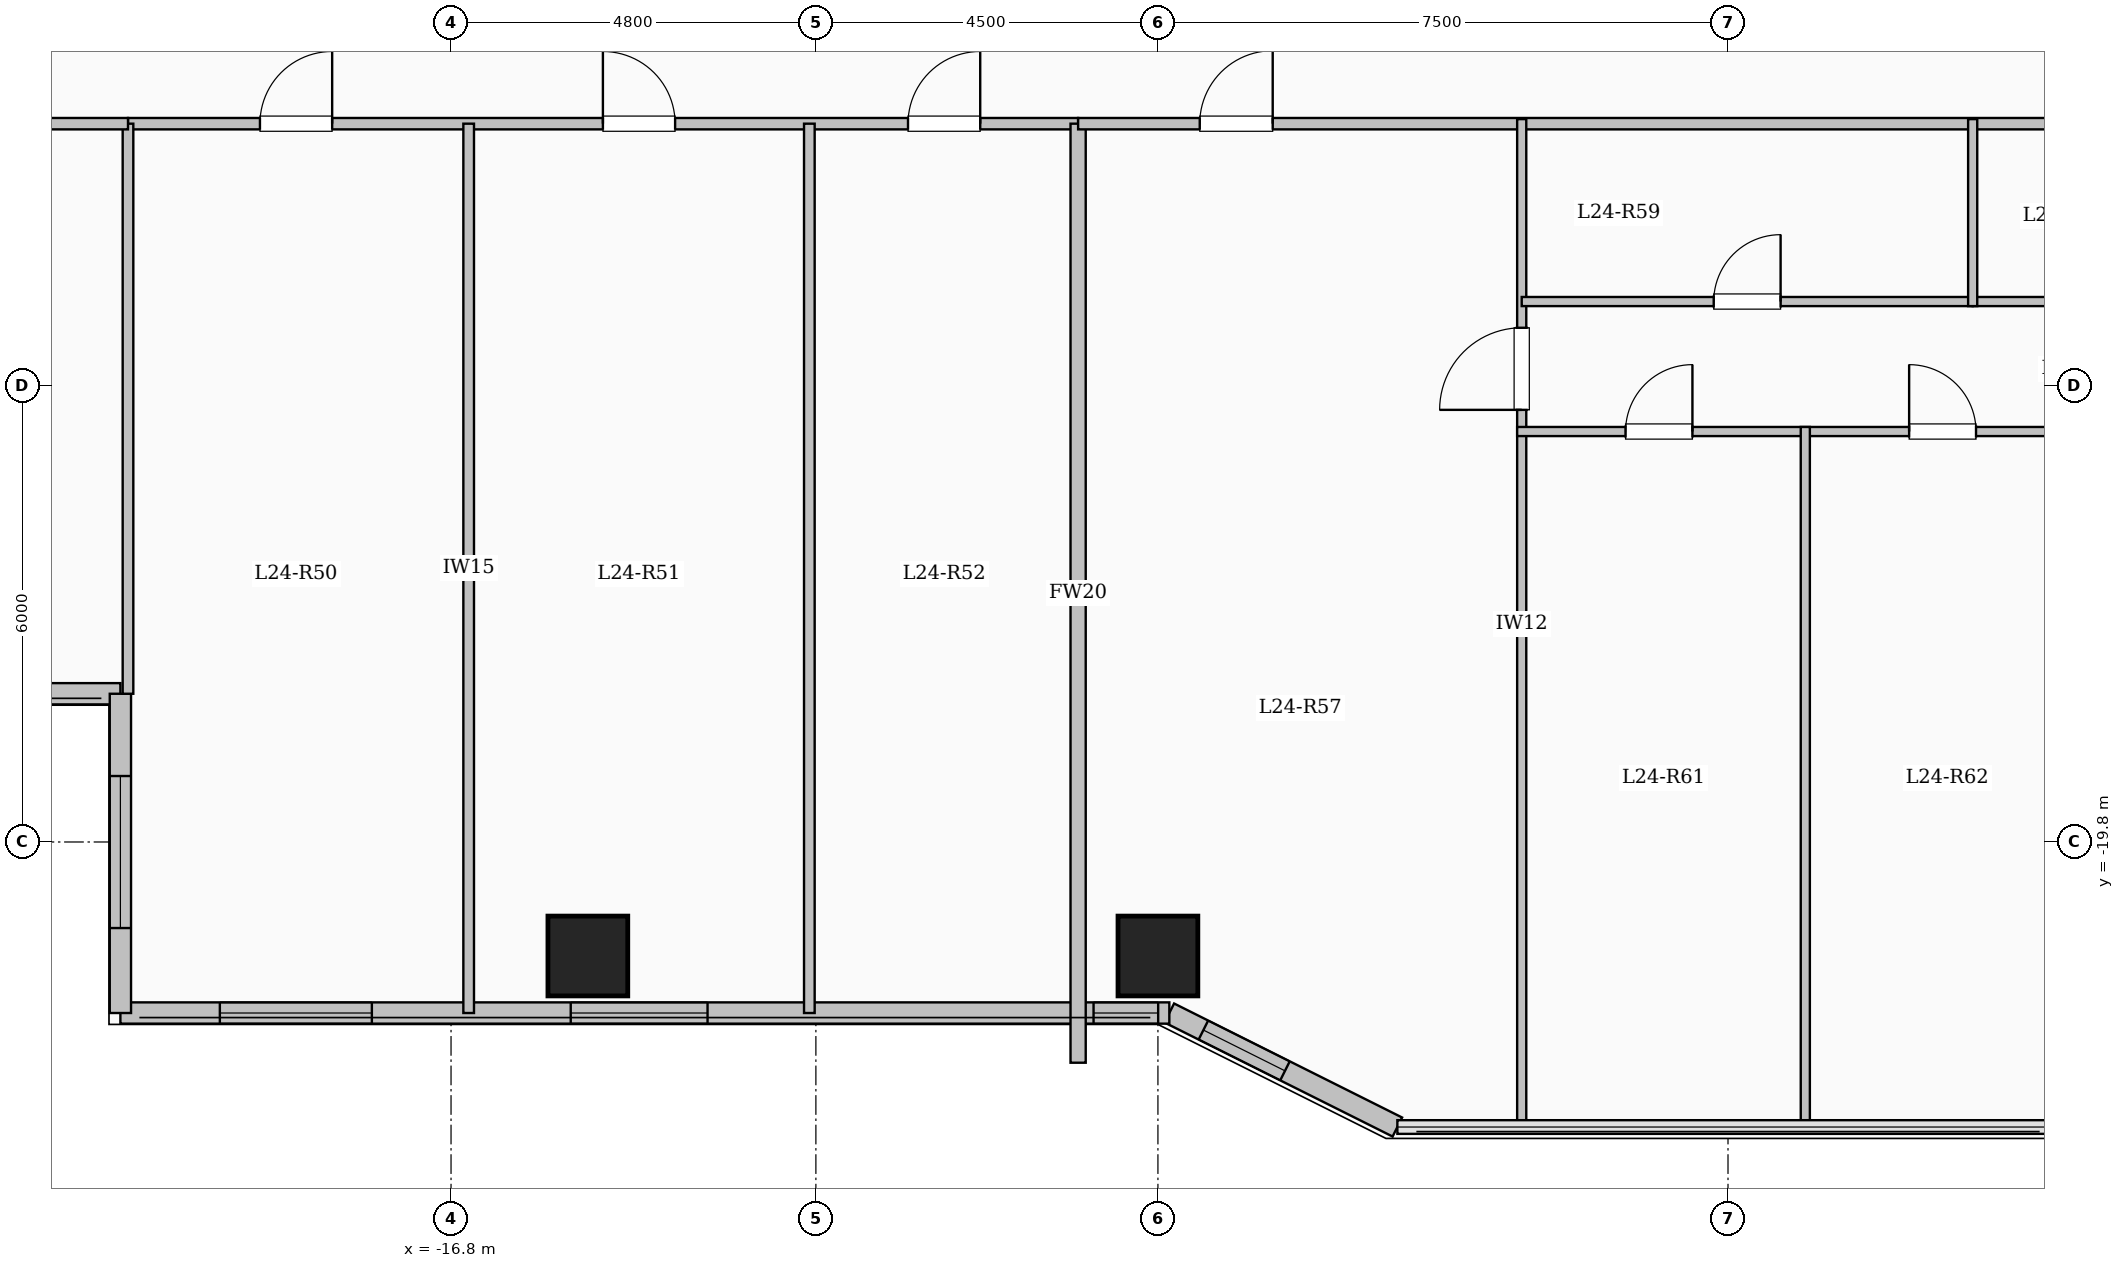
"""IFC4 building model, lengths in metres.
Left out: names, types, materials, properties, quantities, classifications, styles, units other than length and angle.
Written with IfcOpenShell. Run it as: python <this file> out.ifc"""

import sys

from ifc_helpers import new_model, si_unit, direction, frame, frame_2d, origin, origin_2d, place, context, subcontext, project, spatial, rectangle, extrude, element, fill, save


model = new_model("IFC4")
c1 = context("Model", 3, precision=1e-05, world=origin(), true_north=direction((0.0, 1.0)))
c2 = subcontext(c1, "Body", "Model", "MODEL_VIEW")
j1 = project(units=[si_unit("LENGTHUNIT", "METRE"), si_unit("PLANEANGLEUNIT", "RADIAN")], contexts=[c1])
p1 = place(None, origin())
s1 = spatial("IfcSite", under=j1, at=p1, CompositionType="ELEMENT")
p2 = place(p1, origin())
s2 = spatial("IfcBuilding", under=s1, at=p2, CompositionType="ELEMENT")
p3 = place(p2, frame((0.0, 0.0, 91.7)))
s3 = spatial("IfcBuildingStorey", under=s2, at=p3, CompositionType="ELEMENT", Elevation=91.7)
for number, where, z_axis, x_axis in (
    (1, (-15.0, -21.3, 0.0), (0.0, 0.0, 1.0), (1.0, 0.0, 0.0)),
    (2, (-7.5, -21.3, 0.0), (0.0, 0.0, 1.0), (1.0, 0.0, 0.0)),
):
    element("IfcColumn", number, at=place(p3, frame(where, z_axis=z_axis, x_axis=x_axis)), inside=s3, PredefinedType="COLUMN", context=c2, shape_type="SweptSolid", body=[
        extrude(rectangle(XDim=1.05, YDim=1.05, at=origin_2d()), origin(), (0.0, 0.0, 1.0), 3.35),
    ])
p4 = place(p3, frame((-21.15, -17.85, 0.0), z_axis=(0.0, 0.0, 1.0), x_axis=(-1.0, 0.0, 0.0)))
e3 = element("IfcWall", 3, at=p4, inside=s3, PredefinedType="SOLIDWALL", context=c2, shape_type="SweptSolid", body=[
    extrude(rectangle(XDim=5.7, YDim=0.28, at=frame_2d((2.85, 0.0))), origin(), (0.0, 0.0, 1.0), 3.1),
])
p5 = place(p4, frame((1.625, 0.0, 0.9)))
e4 = element("IfcOpeningElement", 4, at=p5, cuts=e3, PredefinedType="OPENING", context=c2, shape_type="SweptSolid", body=[
    extrude(rectangle(XDim=2.4, YDim=1.8, at=frame_2d((1.2, 0.9))), frame((0.0, 0.15, 0.0), z_axis=(0.0, -1.0, 0.0), x_axis=(1.0, 0.0, 0.0)), (0.0, 0.0, 1.0), 0.3),
])
p6 = place(p3, frame((-4.35, -23.55, 0.0), z_axis=(0.0, 0.0, 1.0), x_axis=(-0.894427191, 0.4472135955, 0.0)))
e5 = element("IfcWall", 5, at=p6, inside=s3, PredefinedType="SOLIDWALL", context=c2, shape_type="SweptSolid", body=[
    extrude(rectangle(XDim=3.354, YDim=0.28, at=frame_2d((1.677, 0.0))), origin(), (0.0, 0.0, 1.0), 3.1),
])
p7 = place(p6, frame((1.653, 0.0, 0.95)))
e6 = element("IfcOpeningElement", 6, at=p7, cuts=e5, PredefinedType="OPENING", context=c2, shape_type="SweptSolid", body=[
    extrude(rectangle(XDim=1.2, YDim=1.5, at=frame_2d((0.6, 0.75))), frame((0.0, 0.15, 0.0), z_axis=(0.0, -1.0, 0.0), x_axis=(1.0, 0.0, 0.0)), (0.0, 0.0, 1.0), 0.3),
])
p8 = place(p3, frame((-7.35, -22.05, 0.0), z_axis=(0.0, 0.0, 1.0), x_axis=(-1.0, 0.0, 0.0)))
e7 = element("IfcWall", 7, at=p8, inside=s3, PredefinedType="SOLIDWALL", context=c2, shape_type="SweptSolid", body=[
    extrude(rectangle(XDim=13.8, YDim=0.28, at=frame_2d((6.9, 0.0))), origin(), (0.0, 0.0, 1.0), 3.1),
])
p9 = place(p8, frame((0.147, 0.0, 0.95)))
e8 = element("IfcOpeningElement", 8, at=p9, cuts=e7, PredefinedType="OPENING", context=c2, shape_type="SweptSolid", body=[
    extrude(rectangle(XDim=0.85, YDim=1.5, at=frame_2d((0.425, 0.75))), frame((0.0, 0.15, 0.0), z_axis=(0.0, -1.0, 0.0), x_axis=(1.0, 0.0, 0.0)), (0.0, 0.0, 1.0), 0.3),
])
p10 = place(p8, frame((6.075, 0.0, 0.9)))
e9 = element("IfcOpeningElement", 9, at=p10, cuts=e7, PredefinedType="OPENING", context=c2, shape_type="SweptSolid", body=[
    extrude(rectangle(XDim=1.8, YDim=1.65, at=frame_2d((0.9, 0.825))), frame((0.0, 0.15, 0.0), z_axis=(0.0, -1.0, 0.0), x_axis=(1.0, 0.0, 0.0)), (0.0, 0.0, 1.0), 0.3),
])
p11 = place(p8, frame((10.492, 0.0, 0.9)))
e10 = element("IfcOpeningElement", 10, at=p11, cuts=e7, PredefinedType="OPENING", context=c2, shape_type="SweptSolid", body=[
    extrude(rectangle(XDim=2.0, YDim=1.7, at=frame_2d((1.0, 0.85))), frame((0.0, 0.15, 0.0), z_axis=(0.0, -1.0, 0.0), x_axis=(1.0, 0.0, 0.0)), (0.0, 0.0, 1.0), 0.3),
])
p12 = place(p3, frame((-21.15, -22.05, 0.0), z_axis=(0.0, 0.0, 1.0), x_axis=(0.0, 1.0, 0.0)))
e11 = element("IfcWall", 11, at=p12, inside=s3, PredefinedType="SOLIDWALL", context=c2, shape_type="SweptSolid", body=[
    extrude(rectangle(XDim=4.2, YDim=0.28, at=frame_2d((2.1, 0.0))), origin(), (0.0, 0.0, 1.0), 3.1),
])
p13 = place(p12, frame((1.118, 0.0, 0.9)))
e12 = element("IfcOpeningElement", 12, at=p13, cuts=e11, PredefinedType="OPENING", context=c2, shape_type="SweptSolid", body=[
    extrude(rectangle(XDim=2.0, YDim=1.7, at=frame_2d((1.0, 0.85))), frame((0.0, 0.15, 0.0), z_axis=(0.0, -1.0, 0.0), x_axis=(1.0, 0.0, 0.0)), (0.0, 0.0, 1.0), 0.3),
])
p14 = place(p3, frame((-21.05, -10.35, 0.0), z_axis=(0.0, 0.0, 1.0), x_axis=(1.0, 0.0, 0.0)))
e13 = element("IfcWall", 13, at=p14, inside=s3, PredefinedType="PARTITIONING", context=c2, shape_type="SweptSolid", body=[
    extrude(rectangle(XDim=12.5, YDim=0.15, at=frame_2d((6.25, 0.0))), origin(), (0.0, 0.0, 1.0), 3.1),
])
p15 = place(p14, frame((1.736, 0.0, 0.0)))
e14 = element("IfcOpeningElement", 14, at=p15, cuts=e13, PredefinedType="OPENING", context=c2, shape_type="SweptSolid", body=[
    extrude(rectangle(XDim=0.95, YDim=2.15, at=frame_2d((0.475, 1.075))), frame((0.0, 0.085, 0.0), z_axis=(0.0, -1.0, 0.0), x_axis=(1.0, 0.0, 0.0)), (0.0, 0.0, 1.0), 0.17),
])
p16 = place(p14, frame((6.248, 0.0, 0.0)))
e15 = element("IfcOpeningElement", 15, at=p16, cuts=e13, PredefinedType="OPENING", context=c2, shape_type="SweptSolid", body=[
    extrude(rectangle(XDim=0.95, YDim=2.15, at=frame_2d((0.475, 1.075))), frame((0.0, 0.085, 0.0), z_axis=(0.0, -1.0, 0.0), x_axis=(1.0, 0.0, 0.0)), (0.0, 0.0, 1.0), 0.17),
])
p17 = place(p14, frame((10.262, 0.0, 0.0)))
e16 = element("IfcOpeningElement", 16, at=p17, cuts=e13, PredefinedType="OPENING", context=c2, shape_type="SweptSolid", body=[
    extrude(rectangle(XDim=0.95, YDim=2.15, at=frame_2d((0.475, 1.075))), frame((0.0, 0.085, 0.0), z_axis=(0.0, -1.0, 0.0), x_axis=(1.0, 0.0, 0.0)), (0.0, 0.0, 1.0), 0.17),
])
for number, where, z_axis, x_axis in (
    (17, (-16.568, -22.05, 0.0), (0.0, 0.0, 1.0), (0.0, 1.0, 0.0)),
    (18, (-12.086, -22.05, 0.0), (0.0, 0.0, 1.0), (0.0, 1.0, 0.0)),
):
    element("IfcWall", number, at=place(p3, frame(where, z_axis=z_axis, x_axis=x_axis)), inside=s3, PredefinedType="PARTITIONING", context=c2, shape_type="SweptSolid", body=[
        extrude(rectangle(XDim=11.7, YDim=0.14, at=frame_2d((5.85, 0.0))), origin(), (0.0, 0.0, 1.0), 3.1),
    ])
p18 = place(p3, frame((-8.55, -22.704, 0.0), z_axis=(0.0, 0.0, 1.0), x_axis=(0.0, 1.0, 0.0)))
e19 = element("IfcWall", 19, at=p18, inside=s3, PredefinedType="SOLIDWALL", context=c2, shape_type="SweptSolid", body=[
    extrude(rectangle(XDim=12.354, YDim=0.2, at=frame_2d((6.177, 0.0))), origin(), (0.0, 0.0, 1.0), 3.1),
])
p19 = place(p3, frame((-8.55, -10.35, 0.0), z_axis=(0.0, 0.0, 1.0), x_axis=(1.0, 0.0, 0.0)))
e20 = element("IfcWall", 20, at=p19, inside=s3, PredefinedType="PARTITIONING", context=c2, shape_type="SweptSolid", body=[
    extrude(rectangle(XDim=17.1, YDim=0.15, at=frame_2d((8.55, 0.0))), origin(), (0.0, 0.0, 1.0), 3.1),
])
p20 = place(p19, frame((1.6, 0.0, 0.0)))
e21 = element("IfcOpeningElement", 21, at=p20, cuts=e20, PredefinedType="OPENING", context=c2, shape_type="SweptSolid", body=[
    extrude(rectangle(XDim=0.96, YDim=2.15, at=frame_2d((0.48, 1.075))), frame((0.0, 0.085, 0.0), z_axis=(0.0, -1.0, 0.0), x_axis=(1.0, 0.0, 0.0)), (0.0, 0.0, 1.0), 0.17),
])
p21 = place(p3, frame((-2.714, -23.58, 0.0), z_axis=(0.0, 0.0, 1.0), x_axis=(0.0, 1.0, 0.0)))
e22 = element("IfcWall", 22, at=p21, inside=s3, PredefinedType="PARTITIONING", context=c2, shape_type="SweptSolid", body=[
    extrude(rectangle(XDim=13.29, YDim=0.12, at=frame_2d((6.645, 0.0))), origin(), (0.0, 0.0, 1.0), 3.1),
])
p22 = place(p21, frame((9.465, 0.0, 0.0)))
e23 = element("IfcOpeningElement", 23, at=p22, cuts=e22, PredefinedType="OPENING", context=c2, shape_type="SweptSolid", body=[
    extrude(rectangle(XDim=1.08, YDim=2.15, at=frame_2d((0.54, 1.075))), frame((0.0, 0.07, 0.0), z_axis=(0.0, -1.0, 0.0), x_axis=(1.0, 0.0, 0.0)), (0.0, 0.0, 1.0), 0.14),
])
p23 = place(p3, frame((-2.714, -12.69, 0.0), z_axis=(0.0, 0.0, 1.0), x_axis=(1.0, 0.0, 0.0)))
e24 = element("IfcWall", 24, at=p23, inside=s3, PredefinedType="PARTITIONING", context=c2, shape_type="SweptSolid", body=[
    extrude(rectangle(XDim=5.933, YDim=0.12, at=frame_2d((2.967, 0.0))), origin(), (0.0, 0.0, 1.0), 2.635),
])
p24 = place(p23, frame((2.526, 0.0, 0.0)))
e25 = element("IfcOpeningElement", 25, at=p24, cuts=e24, PredefinedType="OPENING", context=c2, shape_type="SweptSolid", body=[
    extrude(rectangle(XDim=0.88, YDim=2.1, at=frame_2d((0.44, 1.05))), frame((0.0, 0.07, 0.0), z_axis=(0.0, -1.0, 0.0), x_axis=(1.0, 0.0, 0.0)), (0.0, 0.0, 1.0), 0.14),
])
p25 = place(p3, frame((3.219, -12.69, 0.0), z_axis=(0.0, 0.0, 1.0), x_axis=(1.0, 0.0, 0.0)))
e26 = element("IfcWall", 26, at=p25, inside=s3, PredefinedType="PARTITIONING", context=c2, shape_type="SweptSolid", body=[
    extrude(rectangle(XDim=5.331, YDim=0.12, at=frame_2d((2.666, 0.0))), origin(), (0.0, 0.0, 1.0), 2.635),
])
p26 = place(p25, frame((2.226, 0.0, 0.0)))
e27 = element("IfcOpeningElement", 27, at=p26, cuts=e26, PredefinedType="OPENING", context=c2, shape_type="SweptSolid", body=[
    extrude(rectangle(XDim=0.88, YDim=2.1, at=frame_2d((0.44, 1.05))), frame((0.0, 0.07, 0.0), z_axis=(0.0, -1.0, 0.0), x_axis=(1.0, 0.0, 0.0)), (0.0, 0.0, 1.0), 0.14),
])
p27 = place(p3, frame((-2.774, -14.4, 0.0), z_axis=(0.0, 0.0, 1.0), x_axis=(1.0, 0.0, 0.0)))
e28 = element("IfcWall", 28, at=p27, inside=s3, PredefinedType="PARTITIONING", context=c2, shape_type="SweptSolid", body=[
    extrude(rectangle(XDim=11.384, YDim=0.12, at=frame_2d((5.692, 0.0))), origin(), (0.0, 0.0, 1.0), 2.635),
])
p28 = place(p27, frame((1.426, 0.0, 0.0)))
e29 = element("IfcOpeningElement", 29, at=p28, cuts=e28, PredefinedType="OPENING", context=c2, shape_type="SweptSolid", body=[
    extrude(rectangle(XDim=0.88, YDim=2.1, at=frame_2d((0.44, 1.05))), frame((0.0, 0.07, 0.0), z_axis=(0.0, -1.0, 0.0), x_axis=(1.0, 0.0, 0.0)), (0.0, 0.0, 1.0), 0.14),
])
p29 = place(p27, frame((5.157, 0.0, 0.0)))
e30 = element("IfcOpeningElement", 30, at=p29, cuts=e28, PredefinedType="OPENING", context=c2, shape_type="SweptSolid", body=[
    extrude(rectangle(XDim=0.88, YDim=2.1, at=frame_2d((0.44, 1.05))), frame((0.0, 0.07, 0.0), z_axis=(0.0, -1.0, 0.0), x_axis=(1.0, 0.0, 0.0)), (0.0, 0.0, 1.0), 0.14),
])
p30 = place(p27, frame((8.888, 0.0, 0.0)))
e31 = element("IfcOpeningElement", 31, at=p30, cuts=e28, PredefinedType="OPENING", context=c2, shape_type="SweptSolid", body=[
    extrude(rectangle(XDim=0.88, YDim=2.1, at=frame_2d((0.44, 1.05))), frame((0.0, 0.07, 0.0), z_axis=(0.0, -1.0, 0.0), x_axis=(1.0, 0.0, 0.0)), (0.0, 0.0, 1.0), 0.14),
])
p31 = place(p3, frame((3.219, -12.75, 0.0), z_axis=(0.0, 0.0, 1.0), x_axis=(0.0, 1.0, 0.0)))
e32 = element("IfcWall", 32, at=p31, inside=s3, PredefinedType="PARTITIONING", context=c2, shape_type="SweptSolid", body=[
    extrude(rectangle(XDim=2.46, YDim=0.12, at=frame_2d((1.23, 0.0))), origin(), (0.0, 0.0, 1.0), 3.1),
])
p32 = place(p3, frame((1.017, -23.58, 0.0), z_axis=(0.0, 0.0, 1.0), x_axis=(0.0, 1.0, 0.0)))
e33 = element("IfcWall", 33, at=p32, inside=s3, PredefinedType="PARTITIONING", context=c2, shape_type="SweptSolid", body=[
    extrude(rectangle(XDim=9.24, YDim=0.12, at=frame_2d((4.62, 0.0))), origin(), (0.0, 0.0, 1.0), 3.1),
])
p33 = place(p3, frame((-21.05, -17.85, 0.0), z_axis=(0.0, 0.0, 1.0), x_axis=(0.0, 1.0, 0.0)))
e34 = element("IfcWall", 34, at=p33, inside=s3, PredefinedType="PARTITIONING", context=c2, shape_type="SweptSolid", body=[
    extrude(rectangle(XDim=7.5, YDim=0.14, at=frame_2d((3.75, 0.0))), origin(), (0.0, 0.0, 1.0), 3.1),
])
p34 = place(p3, frame((-26.88, -10.35, 0.0), z_axis=(0.0, 0.0, 1.0), x_axis=(1.0, 0.0, 0.0)))
e35 = element("IfcWall", 35, at=p34, inside=s3, PredefinedType="PARTITIONING", context=c2, shape_type="SweptSolid", body=[
    extrude(rectangle(XDim=5.83, YDim=0.15, at=frame_2d((2.915, 0.0))), origin(), (0.0, 0.0, 1.0), 3.1),
])
p35 = place(p34, frame((2.44, 0.0, 0.0)))
e36 = element("IfcOpeningElement", 36, at=p35, cuts=e35, PredefinedType="OPENING", context=c2, shape_type="SweptSolid", body=[
    extrude(rectangle(XDim=0.95, YDim=2.15, at=frame_2d((0.475, 1.075))), frame((0.0, 0.085, 0.0), z_axis=(0.0, -1.0, 0.0), x_axis=(1.0, 0.0, 0.0)), (0.0, 0.0, 1.0), 0.17),
])
p36 = place(p7, origin())
e37 = element("IfcWindow", 37, at=p36, inside=s3, PartitioningType="SINGLE_PANEL", PredefinedType="WINDOW", context=c2, shape_type="SweptSolid", body=[
    extrude(rectangle(XDim=1.2, YDim=1.5, at=frame_2d((0.6, 0.75))), frame((0.0, 0.03, 0.0), z_axis=(0.0, -1.0, 0.0), x_axis=(1.0, 0.0, 0.0)), (0.0, 0.0, 1.0), 0.06),
])
fill(e6, e37)
p37 = place(p9, origin())
e38 = element("IfcWindow", 38, at=p37, inside=s3, PartitioningType="SINGLE_PANEL", PredefinedType="WINDOW", context=c2, shape_type="SweptSolid", body=[
    extrude(rectangle(XDim=0.85, YDim=1.5, at=frame_2d((0.425, 0.75))), frame((0.0, 0.03, 0.0), z_axis=(0.0, -1.0, 0.0), x_axis=(1.0, 0.0, 0.0)), (0.0, 0.0, 1.0), 0.06),
])
fill(e8, e38)
p38 = place(p10, origin())
e39 = element("IfcWindow", 39, at=p38, inside=s3, PartitioningType="SINGLE_PANEL", PredefinedType="WINDOW", context=c2, shape_type="SweptSolid", body=[
    extrude(rectangle(XDim=1.8, YDim=1.65, at=frame_2d((0.9, 0.825))), frame((0.0, 0.03, 0.0), z_axis=(0.0, -1.0, 0.0), x_axis=(1.0, 0.0, 0.0)), (0.0, 0.0, 1.0), 0.06),
])
fill(e9, e39)
p39 = place(p11, origin())
e40 = element("IfcWindow", 40, at=p39, inside=s3, PartitioningType="SINGLE_PANEL", PredefinedType="WINDOW", context=c2, shape_type="SweptSolid", body=[
    extrude(rectangle(XDim=2.0, YDim=1.7, at=frame_2d((1.0, 0.85))), frame((0.0, 0.03, 0.0), z_axis=(0.0, -1.0, 0.0), x_axis=(1.0, 0.0, 0.0)), (0.0, 0.0, 1.0), 0.06),
])
fill(e10, e40)
p40 = place(p13, origin())
e41 = element("IfcWindow", 41, at=p40, inside=s3, PartitioningType="SINGLE_PANEL", PredefinedType="WINDOW", context=c2, shape_type="SweptSolid", body=[
    extrude(rectangle(XDim=2.0, YDim=1.7, at=frame_2d((1.0, 0.85))), frame((0.0, 0.03, 0.0), z_axis=(0.0, -1.0, 0.0), x_axis=(1.0, 0.0, 0.0)), (0.0, 0.0, 1.0), 0.06),
])
fill(e12, e41)
p41 = place(p15, origin())
e42 = element("IfcDoor", 42, at=p41, inside=s3, OperationType="SINGLE_SWING_RIGHT", PredefinedType="DOOR", context=c2, shape_type="SweptSolid", body=[
    extrude(rectangle(XDim=0.95, YDim=2.15, at=frame_2d((0.475, 1.075))), frame((0.0, 0.025, 0.0), z_axis=(0.0, -1.0, 0.0), x_axis=(1.0, 0.0, 0.0)), (0.0, 0.0, 1.0), 0.05),
])
fill(e14, e42)
p42 = place(p16, origin())
e43 = element("IfcDoor", 43, at=p42, inside=s3, OperationType="SINGLE_SWING_LEFT", PredefinedType="DOOR", context=c2, shape_type="SweptSolid", body=[
    extrude(rectangle(XDim=0.95, YDim=2.15, at=frame_2d((0.475, 1.075))), frame((0.0, 0.025, 0.0), z_axis=(0.0, -1.0, 0.0), x_axis=(1.0, 0.0, 0.0)), (0.0, 0.0, 1.0), 0.05),
])
fill(e15, e43)
p43 = place(p17, origin())
e44 = element("IfcDoor", 44, at=p43, inside=s3, OperationType="SINGLE_SWING_RIGHT", PredefinedType="DOOR", context=c2, shape_type="SweptSolid", body=[
    extrude(rectangle(XDim=0.95, YDim=2.15, at=frame_2d((0.475, 1.075))), frame((0.0, 0.025, 0.0), z_axis=(0.0, -1.0, 0.0), x_axis=(1.0, 0.0, 0.0)), (0.0, 0.0, 1.0), 0.05),
])
fill(e16, e44)
p44 = place(p20, origin())
e45 = element("IfcDoor", 45, at=p44, inside=s3, OperationType="SINGLE_SWING_RIGHT", PredefinedType="DOOR", context=c2, shape_type="SweptSolid", body=[
    extrude(rectangle(XDim=0.96, YDim=2.15, at=frame_2d((0.48, 1.075))), frame((0.0, 0.025, 0.0), z_axis=(0.0, -1.0, 0.0), x_axis=(1.0, 0.0, 0.0)), (0.0, 0.0, 1.0), 0.05),
])
fill(e21, e45)
p45 = place(p22, origin())
e46 = element("IfcDoor", 46, at=p45, inside=s3, OperationType="SINGLE_SWING_LEFT", PredefinedType="DOOR", context=c2, shape_type="SweptSolid", body=[
    extrude(rectangle(XDim=1.08, YDim=2.15, at=frame_2d((0.54, 1.075))), frame((0.0, 0.025, 0.0), z_axis=(0.0, -1.0, 0.0), x_axis=(1.0, 0.0, 0.0)), (0.0, 0.0, 1.0), 0.05),
])
fill(e23, e46)
p46 = place(p24, origin())
e47 = element("IfcDoor", 47, at=p46, inside=s3, OperationType="SINGLE_SWING_RIGHT", PredefinedType="DOOR", context=c2, shape_type="SweptSolid", body=[
    extrude(rectangle(XDim=0.88, YDim=2.1, at=frame_2d((0.44, 1.05))), frame((0.0, 0.025, 0.0), z_axis=(0.0, -1.0, 0.0), x_axis=(1.0, 0.0, 0.0)), (0.0, 0.0, 1.0), 0.05),
])
fill(e25, e47)
p47 = place(p28, origin())
e48 = element("IfcDoor", 48, at=p47, inside=s3, OperationType="SINGLE_SWING_RIGHT", PredefinedType="DOOR", context=c2, shape_type="SweptSolid", body=[
    extrude(rectangle(XDim=0.88, YDim=2.1, at=frame_2d((0.44, 1.05))), frame((0.0, 0.025, 0.0), z_axis=(0.0, -1.0, 0.0), x_axis=(1.0, 0.0, 0.0)), (0.0, 0.0, 1.0), 0.05),
])
fill(e29, e48)
p48 = place(p29, origin())
e49 = element("IfcDoor", 49, at=p48, inside=s3, OperationType="SINGLE_SWING_LEFT", PredefinedType="DOOR", context=c2, shape_type="SweptSolid", body=[
    extrude(rectangle(XDim=0.88, YDim=2.1, at=frame_2d((0.44, 1.05))), frame((0.0, 0.025, 0.0), z_axis=(0.0, -1.0, 0.0), x_axis=(1.0, 0.0, 0.0)), (0.0, 0.0, 1.0), 0.05),
])
fill(e30, e49)
save(model, sys.argv[1])
